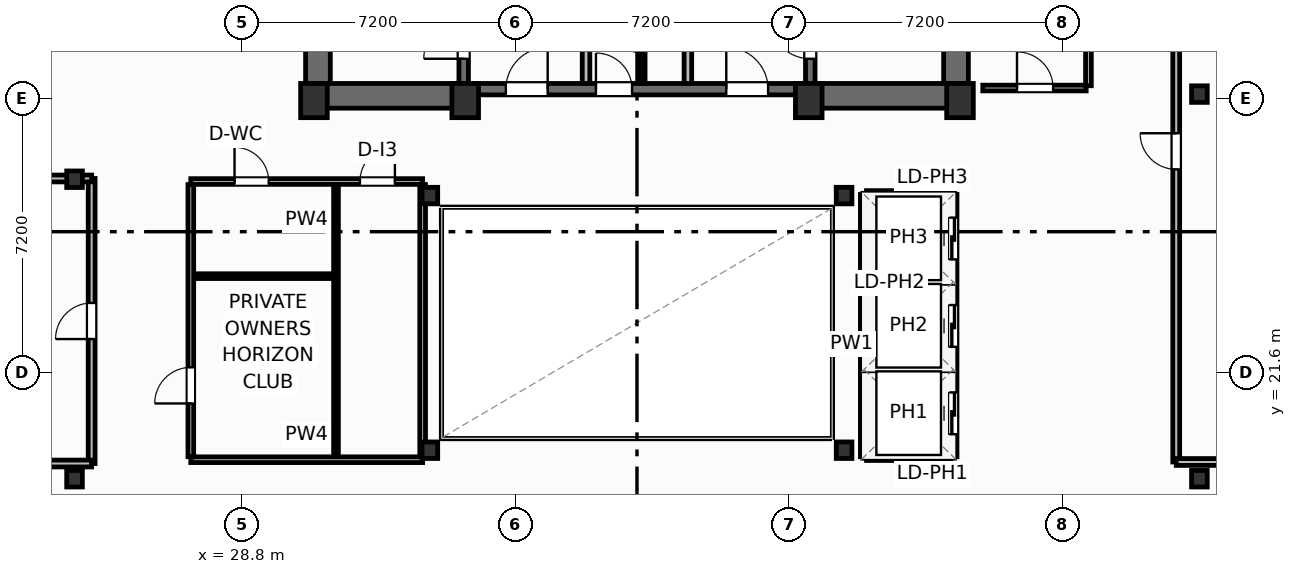
"""IFC4 building model, lengths in metres.
Left out: names, types, materials, properties, quantities, classifications, styles, units other than length and angle.
Written with IfcOpenShell. Run it as: python <this file> out.ifc"""

import sys

from ifc_helpers import new_model, si_unit, direction, frame, frame_2d, origin, origin_2d, place, context, subcontext, project, spatial, rectangle, i_section, extrude, element, fill, save


model = new_model("IFC4")
c1 = context("Model", 3, precision=1e-05, world=origin(), true_north=direction((0.0, 1.0)))
c2 = subcontext(c1, "Body", "Model", "MODEL_VIEW")
j1 = project(units=[si_unit("LENGTHUNIT", "METRE"), si_unit("PLANEANGLEUNIT", "RADIAN")], contexts=[c1])
p1 = place(None, origin())
s1 = spatial("IfcSite", under=j1, at=p1, CompositionType="ELEMENT")
p2 = place(p1, origin())
s2 = spatial("IfcBuilding", under=s1, at=p2, CompositionType="ELEMENT")
p3 = place(p2, frame((0.0, 0.0, 212.7)))
s3 = spatial("IfcBuildingStorey", under=s2, at=p3, CompositionType="ELEMENT", Elevation=212.7)
for number, where, z_axis, x_axis in (
    (1, (30.7, 28.75, 0.0), (0.0, 0.0, 1.0), (1.0, 0.0, 0.0)),
    (2, (34.68, 28.75, 0.0), (0.0, 0.0, 1.0), (1.0, 0.0, 0.0)),
    (3, (43.72, 28.75, 0.0), (0.0, 0.0, 1.0), (1.0, 0.0, 0.0)),
    (4, (47.7, 28.75, 0.0), (0.0, 0.0, 1.0), (1.0, 0.0, 0.0)),
):
    element("IfcColumn", number, at=place(p3, frame(where, z_axis=z_axis, x_axis=x_axis)), inside=s3, PredefinedType="COLUMN", context=c2, shape_type="SweptSolid", body=[
        extrude(rectangle(XDim=0.7, YDim=0.9, at=origin_2d()), origin(), (0.0, 0.0, 1.0), 3.7),
    ])
for number, where, z_axis, x_axis in (
    (5, (33.75, 19.55, 0.0), (0.0, 0.0, 1.0), (1.0, 0.0, 0.0)),
    (6, (44.65, 19.55, 0.0), (0.0, 0.0, 1.0), (1.0, 0.0, 0.0)),
    (7, (33.75, 26.25, 0.0), (0.0, 0.0, 1.0), (1.0, 0.0, 0.0)),
    (8, (44.65, 26.25, 0.0), (0.0, 0.0, 1.0), (1.0, 0.0, 0.0)),
    (9, (24.4, 18.8, 0.0), (0.0, 0.0, 1.0), (1.0, 0.0, 0.0)),
    (10, (24.4, 26.68, 0.0), (0.0, 0.0, 1.0), (1.0, 0.0, 0.0)),
    (11, (54.0, 18.8, 0.0), (0.0, 0.0, 1.0), (1.0, 0.0, 0.0)),
    (12, (54.0, 28.92, 0.0), (0.0, 0.0, 1.0), (1.0, 0.0, 0.0)),
):
    element("IfcColumn", number, at=place(p3, frame(where, z_axis=z_axis, x_axis=x_axis)), inside=s3, PredefinedType="COLUMN", context=c2, shape_type="SweptSolid", body=[
        extrude(i_section(OverallWidth=0.412, OverallDepth=0.435, WebThickness=0.036, FlangeThickness=0.057, FilletRadius=0.025, at=origin_2d()), origin(), (0.0, 0.0, 1.0), 3.7),
    ])
for number, where, z_axis, x_axis in (
    (13, (30.805, 29.2, 0.0), (0.0, 0.0, 1.0), (0.0, 1.0, 0.0)),
    (14, (47.595, 29.2, 0.0), (0.0, 0.0, 1.0), (0.0, 1.0, 0.0)),
):
    element("IfcWall", number, at=place(p3, frame(where, z_axis=z_axis, x_axis=x_axis)), inside=s3, PredefinedType="SHEAR", context=c2, shape_type="SweptSolid", body=[
        extrude(rectangle(XDim=9.22, YDim=0.65, at=frame_2d((4.61, 0.0))), origin(), (0.0, 0.0, 1.0), 3.45),
    ])
p4 = place(p3, frame((30.48, 28.875, 0.0), z_axis=(0.0, 0.0, 1.0), x_axis=(1.0, 0.0, 0.0)))
e15 = element("IfcWall", 15, at=p4, inside=s3, PredefinedType="SHEAR", context=c2, shape_type="SweptSolid", body=[
    extrude(rectangle(XDim=4.32, YDim=0.65, at=frame_2d((2.16, 0.0))), origin(), (0.0, 0.0, 1.0), 3.45),
])
p5 = place(p3, frame((43.6, 28.875, 0.0), z_axis=(0.0, 0.0, 1.0), x_axis=(1.0, 0.0, 0.0)))
e16 = element("IfcWall", 16, at=p5, inside=s3, PredefinedType="SHEAR", context=c2, shape_type="SweptSolid", body=[
    extrude(rectangle(XDim=4.32, YDim=0.65, at=frame_2d((2.16, 0.0))), origin(), (0.0, 0.0, 1.0), 3.45),
])
p6 = place(p3, frame((34.8, 29.05, 0.0), z_axis=(0.0, 0.0, 1.0), x_axis=(1.0, 0.0, 0.0)))
e17 = element("IfcWall", 17, at=p6, inside=s3, PredefinedType="SHEAR", context=c2, shape_type="SweptSolid", body=[
    extrude(rectangle(XDim=8.8, YDim=0.3, at=frame_2d((4.4, 0.0))), origin(), (0.0, 0.0, 1.0), 3.45),
])
p7 = place(p6, frame((0.95, 0.0, 0.0)))
e18 = element("IfcOpeningElement", 18, at=p7, cuts=e17, PredefinedType="OPENING", context=c2, shape_type="SweptSolid", body=[
    extrude(rectangle(XDim=1.1, YDim=2.15, at=frame_2d((0.55, 1.075))), frame((0.0, 0.16, 0.0), z_axis=(0.0, -1.0, 0.0), x_axis=(1.0, 0.0, 0.0)), (0.0, 0.0, 1.0), 0.32),
])
p8 = place(p6, frame((6.75, 0.0, 0.0)))
e19 = element("IfcOpeningElement", 19, at=p8, cuts=e17, PredefinedType="OPENING", context=c2, shape_type="SweptSolid", body=[
    extrude(rectangle(XDim=1.1, YDim=2.15, at=frame_2d((0.55, 1.075))), frame((0.0, 0.16, 0.0), z_axis=(0.0, -1.0, 0.0), x_axis=(1.0, 0.0, 0.0)), (0.0, 0.0, 1.0), 0.32),
])
p9 = place(p6, frame((3.32, 0.0, 0.0)))
e20 = element("IfcOpeningElement", 20, at=p9, cuts=e17, PredefinedType="OPENING", context=c2, shape_type="SweptSolid", body=[
    extrude(rectangle(XDim=0.95, YDim=2.15, at=frame_2d((0.475, 1.075))), frame((0.0, 0.16, 0.0), z_axis=(0.0, -1.0, 0.0), x_axis=(1.0, 0.0, 0.0)), (0.0, 0.0, 1.0), 0.32),
])
p10 = place(p3, frame((34.64, 29.2, 0.0), z_axis=(0.0, 0.0, 1.0), x_axis=(0.0, 1.0, 0.0)))
e21 = element("IfcWall", 21, at=p10, inside=s3, PredefinedType="SHEAR", context=c2, shape_type="SweptSolid", body=[
    extrude(rectangle(XDim=9.22, YDim=0.25, at=frame_2d((4.61, 0.0))), origin(), (0.0, 0.0, 1.0), 3.45),
])
p11 = place(p10, frame((0.65, 0.0, 0.0)))
e22 = element("IfcOpeningElement", 22, at=p11, cuts=e21, PredefinedType="OPENING", context=c2, shape_type="SweptSolid", body=[
    extrude(rectangle(XDim=1.05, YDim=2.15, at=frame_2d((0.525, 1.075))), frame((0.0, 0.135, 0.0), z_axis=(0.0, -1.0, 0.0), x_axis=(1.0, 0.0, 0.0)), (0.0, 0.0, 1.0), 0.27),
])
p12 = place(p3, frame((43.76, 29.2, 0.0), z_axis=(0.0, 0.0, 1.0), x_axis=(0.0, 1.0, 0.0)))
e23 = element("IfcWall", 23, at=p12, inside=s3, PredefinedType="SHEAR", context=c2, shape_type="SweptSolid", body=[
    extrude(rectangle(XDim=9.22, YDim=0.25, at=frame_2d((4.61, 0.0))), origin(), (0.0, 0.0, 1.0), 3.45),
])
p13 = place(p12, frame((0.65, 0.0, 0.0)))
e24 = element("IfcOpeningElement", 24, at=p13, cuts=e23, PredefinedType="OPENING", context=c2, shape_type="SweptSolid", body=[
    extrude(rectangle(XDim=1.05, YDim=2.15, at=frame_2d((0.525, 1.075))), frame((0.0, 0.135, 0.0), z_axis=(0.0, -1.0, 0.0), x_axis=(1.0, 0.0, 0.0)), (0.0, 0.0, 1.0), 0.27),
])
p14 = place(p3, frame((24.85, 19.2, 0.0), z_axis=(0.0, 0.0, 1.0), x_axis=(0.0, 1.0, 0.0)))
e25 = element("IfcWall", 25, at=p14, inside=s3, PredefinedType="PARTITIONING", context=c2, shape_type="SweptSolid", body=[
    extrude(rectangle(XDim=7.5, YDim=0.18, at=frame_2d((3.75, 0.0))), origin(), (0.0, 0.0, 1.0), 3.45),
])
p15 = place(p14, frame((3.275, 0.0, 0.0)))
e26 = element("IfcOpeningElement", 26, at=p15, cuts=e25, PredefinedType="OPENING", context=c2, shape_type="SweptSolid", body=[
    extrude(rectangle(XDim=0.95, YDim=2.05, at=frame_2d((0.475, 1.025))), frame((0.0, 0.1, 0.0), z_axis=(0.0, -1.0, 0.0), x_axis=(1.0, 0.0, 0.0)), (0.0, 0.0, 1.0), 0.2),
])
p16 = place(p3, frame((6.306, 19.2, 0.0), z_axis=(0.0, 0.0, 1.0), x_axis=(1.0, 0.0, 0.0)))
e27 = element("IfcWall", 27, at=p16, inside=s3, PredefinedType="PARTITIONING", context=c2, shape_type="SweptSolid", body=[
    extrude(rectangle(XDim=18.544, YDim=0.18, at=frame_2d((9.272, 0.0))), origin(), (0.0, 0.0, 1.0), 3.45),
])
p17 = place(p3, frame((3.467, 26.7, 0.0), z_axis=(0.0, 0.0, 1.0), x_axis=(1.0, 0.0, 0.0)))
e28 = element("IfcWall", 28, at=p17, inside=s3, PredefinedType="PARTITIONING", context=c2, shape_type="SweptSolid", body=[
    extrude(rectangle(XDim=21.383, YDim=0.18, at=frame_2d((10.691, 0.0))), origin(), (0.0, 0.0, 1.0), 2.662),
])
p18 = place(p3, frame((53.39, 19.24, 0.0), z_axis=(0.0, 0.0, 1.0), x_axis=(0.0, 1.0, 0.0)))
e29 = element("IfcWall", 29, at=p18, inside=s3, PredefinedType="PARTITIONING", context=c2, shape_type="SweptSolid", body=[
    extrude(rectangle(XDim=20.06, YDim=0.18, at=frame_2d((10.03, 0.0))), origin(), (0.0, 0.0, 1.0), 3.45),
])
p19 = place(p18, frame((7.7, 0.0, 0.0)))
e30 = element("IfcOpeningElement", 30, at=p19, cuts=e29, PredefinedType="OPENING", context=c2, shape_type="SweptSolid", body=[
    extrude(rectangle(XDim=0.95, YDim=2.05, at=frame_2d((0.475, 1.025))), frame((0.0, 0.1, 0.0), z_axis=(0.0, -1.0, 0.0), x_axis=(1.0, 0.0, 0.0)), (0.0, 0.0, 1.0), 0.2),
])
p20 = place(p3, frame((53.39, 19.24, 0.0), z_axis=(0.0, 0.0, 1.0), x_axis=(1.0, 0.0, 0.0)))
e31 = element("IfcWall", 31, at=p20, inside=s3, PredefinedType="PARTITIONING", context=c2, shape_type="SweptSolid", body=[
    extrude(rectangle(XDim=22.217, YDim=0.18, at=frame_2d((11.108, 0.0))), origin(), (0.0, 0.0, 1.0), 3.45),
])
for number, where, z_axis, x_axis in (
    (32, (37.86, 29.2, 0.0), (0.0, 0.0, 1.0), (0.0, 1.0, 0.0)),
    (33, (40.54, 29.2, 0.0), (0.0, 0.0, 1.0), (0.0, 1.0, 0.0)),
):
    element("IfcWall", number, at=place(p3, frame(where, z_axis=z_axis, x_axis=x_axis)), inside=s3, PredefinedType="PARTITIONING", context=c2, shape_type="SweptSolid", body=[
        extrude(rectangle(XDim=5.18, YDim=0.2, at=frame_2d((2.59, 0.0))), origin(), (0.0, 0.0, 1.0), 3.45),
    ])
p21 = place(p3, frame((39.35, 29.2, 0.0), z_axis=(0.0, 0.0, 1.0), x_axis=(0.0, 1.0, 0.0)))
e34 = element("IfcWall", 34, at=p21, inside=s3, PredefinedType="PARTITIONING", context=c2, shape_type="SweptSolid", body=[
    extrude(rectangle(XDim=5.22, YDim=0.125, at=frame_2d((2.61, 0.0))), origin(), (0.0, 0.0, 1.0), 3.45),
])
p22 = place(p21, frame((0.8, 0.0, 0.0)))
e35 = element("IfcOpeningElement", 35, at=p22, cuts=e34, PredefinedType="OPENING", context=c2, shape_type="SweptSolid", body=[
    extrude(rectangle(XDim=0.85, YDim=2.05, at=frame_2d((0.425, 1.025))), frame((0.0, 0.073, 0.0), z_axis=(0.0, -1.0, 0.0), x_axis=(1.0, 0.0, 0.0)), (0.0, 0.0, 1.0), 0.145),
])
p23 = place(p21, frame((3.4, 0.0, 0.0)))
e36 = element("IfcOpeningElement", 36, at=p23, cuts=e34, PredefinedType="OPENING", context=c2, shape_type="SweptSolid", body=[
    extrude(rectangle(XDim=0.85, YDim=2.05, at=frame_2d((0.425, 1.025))), frame((0.0, 0.073, 0.0), z_axis=(0.0, -1.0, 0.0), x_axis=(1.0, 0.0, 0.0)), (0.0, 0.0, 1.0), 0.145),
])
p24 = place(p3, frame((27.46, 19.3, 0.0), z_axis=(0.0, 0.0, 1.0), x_axis=(1.0, 0.0, 0.0)))
e37 = element("IfcWall", 37, at=p24, inside=s3, PredefinedType="PARTITIONING", context=c2, shape_type="SweptSolid", body=[
    extrude(rectangle(XDim=6.1, YDim=0.15, at=frame_2d((3.05, 0.0))), origin(), (0.0, 0.0, 1.0), 2.662),
])
p25 = place(p3, frame((27.46, 26.62, 0.0), z_axis=(0.0, 0.0, 1.0), x_axis=(1.0, 0.0, 0.0)))
e38 = element("IfcWall", 38, at=p25, inside=s3, PredefinedType="PARTITIONING", context=c2, shape_type="SweptSolid", body=[
    extrude(rectangle(XDim=6.1, YDim=0.15, at=frame_2d((3.05, 0.0))), origin(), (0.0, 0.0, 1.0), 2.662),
])
p26 = place(p25, frame((1.15, 0.0, 0.0)))
e39 = element("IfcOpeningElement", 39, at=p26, cuts=e38, PredefinedType="OPENING", context=c2, shape_type="SweptSolid", body=[
    extrude(rectangle(XDim=0.9, YDim=2.05, at=frame_2d((0.45, 1.025))), frame((0.0, 0.085, 0.0), z_axis=(0.0, -1.0, 0.0), x_axis=(1.0, 0.0, 0.0)), (0.0, 0.0, 1.0), 0.17),
])
p27 = place(p25, frame((4.45, 0.0, 0.0)))
e40 = element("IfcOpeningElement", 40, at=p27, cuts=e38, PredefinedType="OPENING", context=c2, shape_type="SweptSolid", body=[
    extrude(rectangle(XDim=0.92, YDim=2.05, at=frame_2d((0.46, 1.025))), frame((0.0, 0.085, 0.0), z_axis=(0.0, -1.0, 0.0), x_axis=(1.0, 0.0, 0.0)), (0.0, 0.0, 1.0), 0.17),
])
p28 = place(p3, frame((31.28, 19.38, 0.0), z_axis=(0.0, 0.0, 1.0), x_axis=(0.0, 1.0, 0.0)))
e41 = element("IfcWall", 41, at=p28, inside=s3, PredefinedType="PARTITIONING", context=c2, shape_type="SweptSolid", body=[
    extrude(rectangle(XDim=7.16, YDim=0.125, at=frame_2d((3.58, 0.0))), origin(), (0.0, 0.0, 1.0), 3.45),
])
p29 = place(p3, frame((27.52, 24.13, 0.0), z_axis=(0.0, 0.0, 1.0), x_axis=(1.0, 0.0, 0.0)))
e42 = element("IfcWall", 42, at=p29, inside=s3, PredefinedType="PARTITIONING", context=c2, shape_type="SweptSolid", body=[
    extrude(rectangle(XDim=3.7, YDim=0.125, at=frame_2d((1.85, 0.0))), origin(), (0.0, 0.0, 1.0), 3.45),
])
p30 = place(p3, frame((27.46, 19.38, 0.0), z_axis=(0.0, 0.0, 1.0), x_axis=(0.0, 1.0, 0.0)))
e43 = element("IfcWall", 43, at=p30, inside=s3, PredefinedType="PARTITIONING", context=c2, shape_type="SweptSolid", body=[
    extrude(rectangle(XDim=7.16, YDim=0.15, at=frame_2d((3.58, 0.0))), origin(), (0.0, 0.0, 1.0), 3.45),
])
p31 = place(p30, frame((1.4, 0.0, 0.0)))
e44 = element("IfcOpeningElement", 44, at=p31, cuts=e43, PredefinedType="OPENING", context=c2, shape_type="SweptSolid", body=[
    extrude(rectangle(XDim=0.95, YDim=2.05, at=frame_2d((0.475, 1.025))), frame((0.0, 0.085, 0.0), z_axis=(0.0, -1.0, 0.0), x_axis=(1.0, 0.0, 0.0)), (0.0, 0.0, 1.0), 0.17),
])
p32 = place(p3, frame((33.56, 19.38, 0.0), z_axis=(0.0, 0.0, 1.0), x_axis=(0.0, 1.0, 0.0)))
e45 = element("IfcWall", 45, at=p32, inside=s3, PredefinedType="PARTITIONING", context=c2, shape_type="SweptSolid", body=[
    extrude(rectangle(XDim=7.16, YDim=0.15, at=frame_2d((3.58, 0.0))), origin(), (0.0, 0.0, 1.0), 2.824),
])
p33 = place(p3, frame((48.3, 29.08, 0.0), z_axis=(0.0, 0.0, 1.0), x_axis=(1.0, 0.0, 0.0)))
e46 = element("IfcWall", 46, at=p33, inside=s3, PredefinedType="PARTITIONING", context=c2, shape_type="SweptSolid", body=[
    extrude(rectangle(XDim=2.72, YDim=0.15, at=frame_2d((1.36, 0.0))), origin(), (0.0, 0.0, 1.0), 2.662),
])
p34 = place(p33, frame((0.9, 0.0, 0.0)))
e47 = element("IfcOpeningElement", 47, at=p34, cuts=e46, PredefinedType="OPENING", context=c2, shape_type="SweptSolid", body=[
    extrude(rectangle(XDim=0.95, YDim=2.05, at=frame_2d((0.475, 1.025))), frame((0.0, 0.085, 0.0), z_axis=(0.0, -1.0, 0.0), x_axis=(1.0, 0.0, 0.0)), (0.0, 0.0, 1.0), 0.17),
])
p35 = place(p3, frame((51.08, 29.14, 0.0), z_axis=(0.0, 0.0, 1.0), x_axis=(0.0, 1.0, 0.0)))
e48 = element("IfcWall", 48, at=p35, inside=s3, PredefinedType="PARTITIONING", context=c2, shape_type="SweptSolid", body=[
    extrude(rectangle(XDim=4.69, YDim=0.15, at=frame_2d((2.345, 0.0))), origin(), (0.0, 0.0, 1.0), 3.45),
])
for number, where, z_axis, x_axis in (
    (49, (45.24, 21.675, 0.0), (0.0, 0.0, 1.0), (1.0, 0.0, 0.0)),
    (50, (45.24, 23.975, 0.0), (0.0, 0.0, 1.0), (1.0, 0.0, 0.0)),
):
    element("IfcWall", number, at=place(p3, frame(where, z_axis=z_axis, x_axis=x_axis)), inside=s3, PredefinedType="PARTITIONING", context=c2, shape_type="SweptSolid", body=[
        extrude(rectangle(XDim=2.22, YDim=0.2, at=frame_2d((1.11, 0.0))), origin(), (0.0, 0.0, 1.0), 3.45),
    ])
p36 = place(p3, frame((45.24, 19.38, 0.0), z_axis=(0.0, 0.0, 1.0), x_axis=(1.0, 0.0, 0.0)))
e51 = element("IfcWall", 51, at=p36, inside=s3, PredefinedType="PARTITIONING", context=c2, shape_type="SweptSolid", body=[
    extrude(rectangle(XDim=2.22, YDim=0.2, at=frame_2d((1.11, 0.0))), origin(), (0.0, 0.0, 1.0), 2.662),
])
p37 = place(p3, frame((45.24, 26.28, 0.0), z_axis=(0.0, 0.0, 1.0), x_axis=(1.0, 0.0, 0.0)))
e52 = element("IfcWall", 52, at=p37, inside=s3, PredefinedType="PARTITIONING", context=c2, shape_type="SweptSolid", body=[
    extrude(rectangle(XDim=2.22, YDim=0.2, at=frame_2d((1.11, 0.0))), origin(), (0.0, 0.0, 1.0), 3.45),
])
p38 = place(p3, frame((45.18, 19.38, 0.0), z_axis=(0.0, 0.0, 1.0), x_axis=(0.0, 1.0, 0.0)))
e53 = element("IfcWall", 53, at=p38, inside=s3, PredefinedType="PARTITIONING", context=c2, shape_type="SweptSolid", body=[
    extrude(rectangle(XDim=6.9, YDim=0.2, at=frame_2d((3.45, 0.0))), origin(), (0.0, 0.0, 1.0), 3.45),
])
p39 = place(p3, frame((47.52, 19.38, 0.0), z_axis=(0.0, 0.0, 1.0), x_axis=(0.0, 1.0, 0.0)))
e54 = element("IfcWall", 54, at=p39, inside=s3, PredefinedType="PARTITIONING", context=c2, shape_type="SweptSolid", body=[
    extrude(rectangle(XDim=6.9, YDim=0.2, at=frame_2d((3.45, 0.0))), origin(), (0.0, 0.0, 1.0), 3.45),
])
p40 = place(p39, frame((0.59, 0.0, 0.0)))
e55 = element("IfcOpeningElement", 55, at=p40, cuts=e54, PredefinedType="OPENING", context=c2, shape_type="SweptSolid", body=[
    extrude(rectangle(XDim=1.1, YDim=2.15, at=frame_2d((0.55, 1.075))), frame((0.0, 0.11, 0.0), z_axis=(0.0, -1.0, 0.0), x_axis=(1.0, 0.0, 0.0)), (0.0, 0.0, 1.0), 0.22),
])
p41 = place(p39, frame((2.89, 0.0, 0.0)))
e56 = element("IfcOpeningElement", 56, at=p41, cuts=e54, PredefinedType="OPENING", context=c2, shape_type="SweptSolid", body=[
    extrude(rectangle(XDim=1.1, YDim=2.15, at=frame_2d((0.55, 1.075))), frame((0.0, 0.11, 0.0), z_axis=(0.0, -1.0, 0.0), x_axis=(1.0, 0.0, 0.0)), (0.0, 0.0, 1.0), 0.22),
])
p42 = place(p39, frame((5.19, 0.0, 0.0)))
e57 = element("IfcOpeningElement", 57, at=p42, cuts=e54, PredefinedType="OPENING", context=c2, shape_type="SweptSolid", body=[
    extrude(rectangle(XDim=1.1, YDim=2.15, at=frame_2d((0.55, 1.075))), frame((0.0, 0.11, 0.0), z_axis=(0.0, -1.0, 0.0), x_axis=(1.0, 0.0, 0.0)), (0.0, 0.0, 1.0), 0.22),
])
p43 = place(p15, origin())
e58 = element("IfcDoor", 58, at=p43, inside=s3, OperationType="SINGLE_SWING_LEFT", PredefinedType="DOOR", context=c2, shape_type="SweptSolid", body=[
    extrude(rectangle(XDim=0.95, YDim=2.05, at=frame_2d((0.475, 1.025))), frame((0.0, 0.025, 0.0), z_axis=(0.0, -1.0, 0.0), x_axis=(1.0, 0.0, 0.0)), (0.0, 0.0, 1.0), 0.05),
])
fill(e26, e58)
p44 = place(p19, origin())
e59 = element("IfcDoor", 59, at=p44, inside=s3, OperationType="SINGLE_SWING_RIGHT", PredefinedType="DOOR", context=c2, shape_type="SweptSolid", body=[
    extrude(rectangle(XDim=0.95, YDim=2.05, at=frame_2d((0.475, 1.025))), frame((0.0, 0.025, 0.0), z_axis=(0.0, -1.0, 0.0), x_axis=(1.0, 0.0, 0.0)), (0.0, 0.0, 1.0), 0.05),
])
fill(e30, e59)
p45 = place(p11, origin())
e60 = element("IfcDoor", 60, at=p45, inside=s3, OperationType="SINGLE_SWING_LEFT", PredefinedType="DOOR", context=c2, shape_type="SweptSolid", body=[
    extrude(rectangle(XDim=1.05, YDim=2.15, at=frame_2d((0.525, 1.075))), frame((0.0, 0.025, 0.0), z_axis=(0.0, -1.0, 0.0), x_axis=(1.0, 0.0, 0.0)), (0.0, 0.0, 1.0), 0.05),
])
fill(e22, e60)
p46 = place(p13, origin())
e61 = element("IfcDoor", 61, at=p46, inside=s3, OperationType="SINGLE_SWING_RIGHT", PredefinedType="DOOR", context=c2, shape_type="SweptSolid", body=[
    extrude(rectangle(XDim=1.05, YDim=2.15, at=frame_2d((0.525, 1.075))), frame((0.0, 0.025, 0.0), z_axis=(0.0, -1.0, 0.0), x_axis=(1.0, 0.0, 0.0)), (0.0, 0.0, 1.0), 0.05),
])
fill(e24, e61)
p47 = place(p7, origin())
e62 = element("IfcDoor", 62, at=p47, inside=s3, OperationType="SINGLE_SWING_RIGHT", PredefinedType="DOOR", context=c2, shape_type="SweptSolid", body=[
    extrude(rectangle(XDim=1.1, YDim=2.15, at=frame_2d((0.55, 1.075))), frame((0.0, 0.025, 0.0), z_axis=(0.0, -1.0, 0.0), x_axis=(1.0, 0.0, 0.0)), (0.0, 0.0, 1.0), 0.05),
])
fill(e18, e62)
p48 = place(p8, origin())
e63 = element("IfcDoor", 63, at=p48, inside=s3, OperationType="SINGLE_SWING_LEFT", PredefinedType="DOOR", context=c2, shape_type="SweptSolid", body=[
    extrude(rectangle(XDim=1.1, YDim=2.15, at=frame_2d((0.55, 1.075))), frame((0.0, 0.025, 0.0), z_axis=(0.0, -1.0, 0.0), x_axis=(1.0, 0.0, 0.0)), (0.0, 0.0, 1.0), 0.05),
])
fill(e19, e63)
p49 = place(p22, origin())
e64 = element("IfcDoor", 64, at=p49, inside=s3, OperationType="SINGLE_SWING_RIGHT", PredefinedType="DOOR", context=c2, shape_type="SweptSolid", body=[
    extrude(rectangle(XDim=0.85, YDim=2.05, at=frame_2d((0.425, 1.025))), frame((0.0, 0.025, 0.0), z_axis=(0.0, -1.0, 0.0), x_axis=(1.0, 0.0, 0.0)), (0.0, 0.0, 1.0), 0.05),
])
fill(e35, e64)
p50 = place(p9, origin())
e65 = element("IfcDoor", 65, at=p50, inside=s3, OperationType="SINGLE_SWING_LEFT", PredefinedType="DOOR", context=c2, shape_type="SweptSolid", body=[
    extrude(rectangle(XDim=0.95, YDim=2.15, at=frame_2d((0.475, 1.075))), frame((0.0, 0.025, 0.0), z_axis=(0.0, -1.0, 0.0), x_axis=(1.0, 0.0, 0.0)), (0.0, 0.0, 1.0), 0.05),
])
fill(e20, e65)
p51 = place(p26, origin())
e66 = element("IfcDoor", 66, at=p51, inside=s3, OperationType="SINGLE_SWING_LEFT", PredefinedType="DOOR", context=c2, shape_type="SweptSolid", body=[
    extrude(rectangle(XDim=0.9, YDim=2.05, at=frame_2d((0.45, 1.025))), frame((0.0, 0.025, 0.0), z_axis=(0.0, -1.0, 0.0), x_axis=(1.0, 0.0, 0.0)), (0.0, 0.0, 1.0), 0.05),
])
fill(e39, e66)
p52 = place(p27, origin())
e67 = element("IfcDoor", 67, at=p52, inside=s3, OperationType="SINGLE_SWING_RIGHT", PredefinedType="DOOR", context=c2, shape_type="SweptSolid", body=[
    extrude(rectangle(XDim=0.92, YDim=2.05, at=frame_2d((0.46, 1.025))), frame((0.0, 0.025, 0.0), z_axis=(0.0, -1.0, 0.0), x_axis=(1.0, 0.0, 0.0)), (0.0, 0.0, 1.0), 0.05),
])
fill(e40, e67)
p53 = place(p31, origin())
e68 = element("IfcDoor", 68, at=p53, inside=s3, OperationType="SINGLE_SWING_LEFT", PredefinedType="DOOR", context=c2, shape_type="SweptSolid", body=[
    extrude(rectangle(XDim=0.95, YDim=2.05, at=frame_2d((0.475, 1.025))), frame((0.0, 0.025, 0.0), z_axis=(0.0, -1.0, 0.0), x_axis=(1.0, 0.0, 0.0)), (0.0, 0.0, 1.0), 0.05),
])
fill(e44, e68)
p54 = place(p34, origin())
e69 = element("IfcDoor", 69, at=p54, inside=s3, OperationType="SINGLE_SWING_LEFT", PredefinedType="DOOR", context=c2, shape_type="SweptSolid", body=[
    extrude(rectangle(XDim=0.95, YDim=2.05, at=frame_2d((0.475, 1.025))), frame((0.0, 0.025, 0.0), z_axis=(0.0, -1.0, 0.0), x_axis=(1.0, 0.0, 0.0)), (0.0, 0.0, 1.0), 0.05),
])
fill(e47, e69)
p55 = place(p40, origin())
e70 = element("IfcDoor", 70, at=p55, inside=s3, OperationType="SLIDING_TO_LEFT", PredefinedType="DOOR", context=c2, shape_type="SweptSolid", body=[
    extrude(rectangle(XDim=1.1, YDim=2.15, at=frame_2d((0.55, 1.075))), frame((0.0, 0.025, 0.0), z_axis=(0.0, -1.0, 0.0), x_axis=(1.0, 0.0, 0.0)), (0.0, 0.0, 1.0), 0.05),
])
fill(e55, e70)
p56 = place(p41, origin())
e71 = element("IfcDoor", 71, at=p56, inside=s3, OperationType="SLIDING_TO_LEFT", PredefinedType="DOOR", context=c2, shape_type="SweptSolid", body=[
    extrude(rectangle(XDim=1.1, YDim=2.15, at=frame_2d((0.55, 1.075))), frame((0.0, 0.025, 0.0), z_axis=(0.0, -1.0, 0.0), x_axis=(1.0, 0.0, 0.0)), (0.0, 0.0, 1.0), 0.05),
])
fill(e56, e71)
p57 = place(p42, origin())
e72 = element("IfcDoor", 72, at=p57, inside=s3, OperationType="SLIDING_TO_LEFT", PredefinedType="DOOR", context=c2, shape_type="SweptSolid", body=[
    extrude(rectangle(XDim=1.1, YDim=2.15, at=frame_2d((0.55, 1.075))), frame((0.0, 0.025, 0.0), z_axis=(0.0, -1.0, 0.0), x_axis=(1.0, 0.0, 0.0)), (0.0, 0.0, 1.0), 0.05),
])
fill(e57, e72)
save(model, sys.argv[1])
